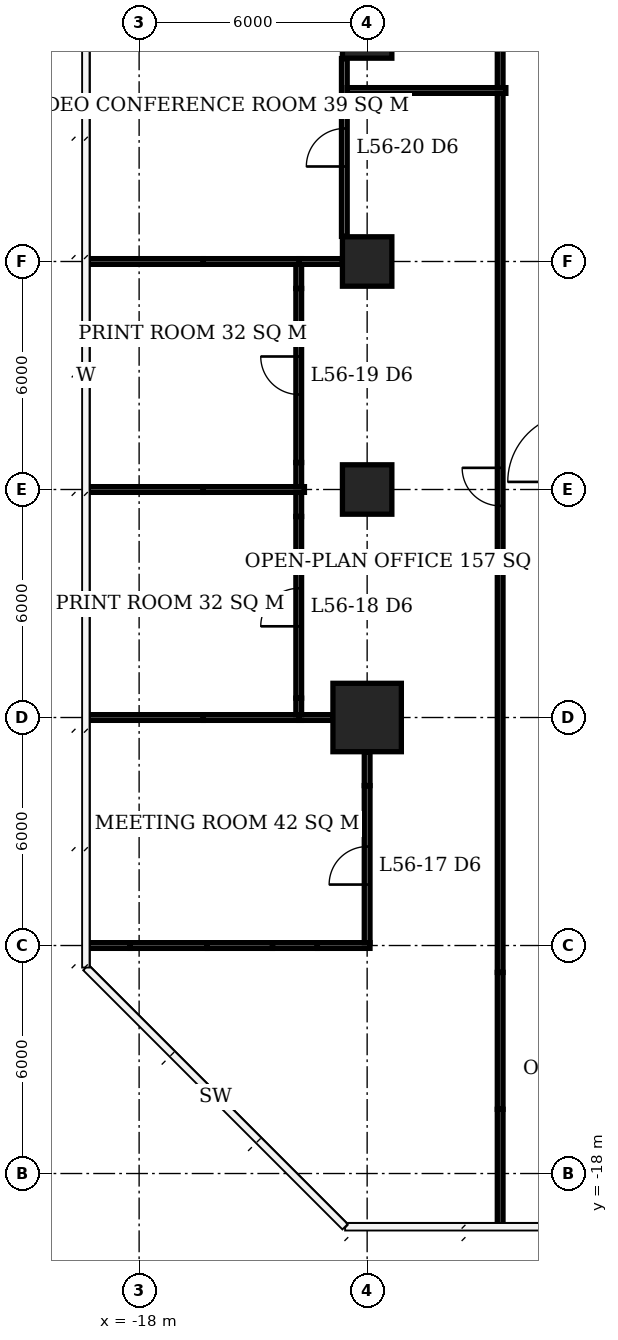
"""IFC4 building model, lengths in metres.
Left out: names, types, materials, properties, quantities, classifications, styles, units other than length and angle.
Written with IfcOpenShell. Run it as: python <this file> out.ifc"""

import sys

from ifc_helpers import new_model, si_unit, direction, frame, frame_2d, origin, origin_2d, place, context, subcontext, project, spatial, rectangle, extrude, element, fill, save


model = new_model("IFC4")
c1 = context("Model", 3, precision=1e-05, world=origin(), true_north=direction((0.0, 1.0)))
c2 = subcontext(c1, "Body", "Model", "MODEL_VIEW")
j1 = project(units=[si_unit("LENGTHUNIT", "METRE"), si_unit("PLANEANGLEUNIT", "RADIAN")], contexts=[c1])
p1 = place(None, origin())
s1 = spatial("IfcSite", under=j1, at=p1, CompositionType="ELEMENT")
p2 = place(p1, origin())
s2 = spatial("IfcBuilding", under=s1, at=p2, CompositionType="ELEMENT")
p3 = place(p2, frame((0.0, 0.0, 227.9)))
s3 = spatial("IfcBuildingStorey", under=s2, at=p3, CompositionType="ELEMENT", Elevation=227.9)
p4 = place(p3, frame((-12.0, -6.0, 0.0), z_axis=(0.0, 0.0, 1.0), x_axis=(1.0, 0.0, 0.0)))
e1 = element("IfcColumn", 1, at=p4, inside=s3, PredefinedType="COLUMN", context=c2, shape_type="SweptSolid", body=[
    extrude(rectangle(XDim=1.8, YDim=1.8, at=origin_2d()), origin(), (0.0, 0.0, 1.0), 3.9),
])
for number, where, z_axis, x_axis in (
    (2, (-12.0, 0.0, 0.0), (0.0, 0.0, 1.0), (1.0, 0.0, 0.0)),
    (3, (-12.0, 6.0, 0.0), (0.0, 0.0, 1.0), (1.0, 0.0, 0.0)),
    (4, (-12.0, 12.0, 0.0), (0.0, 0.0, 1.0), (1.0, 0.0, 0.0)),
):
    element("IfcColumn", number, at=place(p3, frame(where, z_axis=z_axis, x_axis=x_axis)), inside=s3, PredefinedType="COLUMN", context=c2, shape_type="SweptSolid", body=[
        extrude(rectangle(XDim=1.3, YDim=1.3, at=origin_2d()), origin(), (0.0, 0.0, 1.0), 3.9),
    ])
p5 = place(p3, frame((-19.4, -12.0, 0.0), z_axis=(0.0, 0.0, 1.0), x_axis=(1.0, 0.0, 0.0)))
e5 = element("IfcWall", 5, at=p5, inside=s3, PredefinedType="PARTITIONING", context=c2, shape_type="SweptSolid", body=[
    extrude(rectangle(XDim=1.163, YDim=0.15, at=frame_2d((0.582, 0.0))), origin(), (0.0, 0.0, 1.0), 3.65),
])
p6 = place(p3, frame((-18.237, -12.0, 0.0), z_axis=(0.0, 0.0, 1.0), x_axis=(1.0, 0.0, 0.0)))
e6 = element("IfcWall", 6, at=p6, inside=s3, PredefinedType="PARTITIONING", context=c2, shape_type="SweptSolid", body=[
    extrude(rectangle(XDim=2.029, YDim=0.15, at=frame_2d((1.015, 0.0))), origin(), (0.0, 0.0, 1.0), 2.65),
])
p7 = place(p3, frame((-16.208, -12.0, 0.0), z_axis=(0.0, 0.0, 1.0), x_axis=(1.0, 0.0, 0.0)))
e7 = element("IfcWall", 7, at=p7, inside=s3, PredefinedType="PARTITIONING", context=c2, shape_type="SweptSolid", body=[
    extrude(rectangle(XDim=1.718, YDim=0.15, at=frame_2d((0.859, 0.0))), origin(), (0.0, 0.0, 1.0), 3.65),
])
p8 = place(p3, frame((-14.49, -12.0, 0.0), z_axis=(0.0, 0.0, 1.0), x_axis=(1.0, 0.0, 0.0)))
e8 = element("IfcWall", 8, at=p8, inside=s3, PredefinedType="PARTITIONING", context=c2, shape_type="SweptSolid", body=[
    extrude(rectangle(XDim=1.18, YDim=0.15, at=frame_2d((0.59, 0.0))), origin(), (0.0, 0.0, 1.0), 2.65),
])
p9 = place(p3, frame((-13.31, -12.0, 0.0), z_axis=(0.0, 0.0, 1.0), x_axis=(1.0, 0.0, 0.0)))
e9 = element("IfcWall", 9, at=p9, inside=s3, PredefinedType="PARTITIONING", context=c2, shape_type="SweptSolid", body=[
    extrude(rectangle(XDim=1.385, YDim=0.15, at=frame_2d((0.692, 0.0))), origin(), (0.0, 0.0, 1.0), 3.65),
])
p10 = place(p3, frame((-19.4, -6.0, 0.0), z_axis=(0.0, 0.0, 1.0), x_axis=(1.0, 0.0, 0.0)))
e10 = element("IfcWall", 10, at=p10, inside=s3, PredefinedType="PARTITIONING", context=c2, shape_type="SweptSolid", body=[
    extrude(rectangle(XDim=3.09, YDim=0.15, at=frame_2d((1.545, 0.0))), origin(), (0.0, 0.0, 1.0), 3.65),
])
p11 = place(p3, frame((-16.31, -6.0, 0.0), z_axis=(0.0, 0.0, 1.0), x_axis=(1.0, 0.0, 0.0)))
e11 = element("IfcWall", 11, at=p11, inside=s3, PredefinedType="PARTITIONING", context=c2, shape_type="SweptSolid", body=[
    extrude(rectangle(XDim=2.585, YDim=0.15, at=frame_2d((1.292, 0.0))), origin(), (0.0, 0.0, 1.0), 2.65),
])
p12 = place(p3, frame((-13.8, -6.0, 0.0), z_axis=(0.0, 0.0, 1.0), x_axis=(1.0, 0.0, 0.0)))
e12 = element("IfcWall", 12, at=p12, inside=s3, PredefinedType="PARTITIONING", context=c2, shape_type="SweptSolid", body=[
    extrude(rectangle(XDim=0.9, YDim=0.15, at=frame_2d((0.45, 0.0))), origin(), (0.0, 0.0, 1.0), 2.65),
])
p13 = place(p3, frame((-19.35, 0.0, 0.0), z_axis=(0.0, 0.0, 1.0), x_axis=(1.0, 0.0, 0.0)))
e13 = element("IfcWall", 13, at=p13, inside=s3, PredefinedType="PARTITIONING", context=c2, shape_type="SweptSolid", body=[
    extrude(rectangle(XDim=3.04, YDim=0.15, at=frame_2d((1.52, 0.0))), origin(), (0.0, 0.0, 1.0), 3.65),
])
p14 = place(p3, frame((-16.31, 0.0, 0.0), z_axis=(0.0, 0.0, 1.0), x_axis=(1.0, 0.0, 0.0)))
e14 = element("IfcWall", 14, at=p14, inside=s3, PredefinedType="PARTITIONING", context=c2, shape_type="SweptSolid", body=[
    extrude(rectangle(XDim=2.66, YDim=0.15, at=frame_2d((1.33, 0.0))), origin(), (0.0, 0.0, 1.0), 2.65),
])
p15 = place(p3, frame((-19.35, 6.0, 0.0), z_axis=(0.0, 0.0, 1.0), x_axis=(1.0, 0.0, 0.0)))
e15 = element("IfcWall", 15, at=p15, inside=s3, PredefinedType="PARTITIONING", context=c2, shape_type="SweptSolid", body=[
    extrude(rectangle(XDim=3.04, YDim=0.15, at=frame_2d((1.52, 0.0))), origin(), (0.0, 0.0, 1.0), 3.65),
])
p16 = place(p3, frame((-16.31, 6.0, 0.0), z_axis=(0.0, 0.0, 1.0), x_axis=(1.0, 0.0, 0.0)))
e16 = element("IfcWall", 16, at=p16, inside=s3, PredefinedType="PARTITIONING", context=c2, shape_type="SweptSolid", body=[
    extrude(rectangle(XDim=2.585, YDim=0.15, at=frame_2d((1.292, 0.0))), origin(), (0.0, 0.0, 1.0), 2.65),
])
p17 = place(p3, frame((-13.8, 6.0, 0.0), z_axis=(0.0, 0.0, 1.0), x_axis=(1.0, 0.0, 0.0)))
e17 = element("IfcWall", 17, at=p17, inside=s3, PredefinedType="PARTITIONING", context=c2, shape_type="SweptSolid", body=[
    extrude(rectangle(XDim=1.15, YDim=0.15, at=frame_2d((0.575, 0.0))), origin(), (0.0, 0.0, 1.0), 2.65),
])
p18 = place(p3, frame((-13.8, -5.925, 0.0), z_axis=(0.0, 0.0, 1.0), x_axis=(0.0, 1.0, 0.0)))
e18 = element("IfcWall", 18, at=p18, inside=s3, PredefinedType="PARTITIONING", context=c2, shape_type="SweptSolid", body=[
    extrude(rectangle(XDim=0.435, YDim=0.15, at=frame_2d((0.218, 0.0))), origin(), (0.0, 0.0, 1.0), 2.65),
])
p19 = place(p3, frame((-13.8, -5.49, 0.0), z_axis=(0.0, 0.0, 1.0), x_axis=(0.0, 1.0, 0.0)))
e19 = element("IfcWall", 19, at=p19, inside=s3, PredefinedType="PARTITIONING", context=c2, shape_type="SweptSolid", body=[
    extrude(rectangle(XDim=4.78, YDim=0.15, at=frame_2d((2.39, 0.0))), origin(), (0.0, 0.0, 1.0), 3.65),
])
p20 = place(p19, frame((1.89, 0.0, 0.0)))
e20 = element("IfcOpeningElement", 20, at=p20, cuts=e19, PredefinedType="OPENING", context=c2, shape_type="SweptSolid", body=[
    extrude(rectangle(XDim=1.0, YDim=2.1, at=frame_2d((0.5, 1.05))), frame((0.0, 0.085, 0.0), z_axis=(0.0, -1.0, 0.0), x_axis=(1.0, 0.0, 0.0)), (0.0, 0.0, 1.0), 0.17),
])
for number, where, z_axis, x_axis in (
    (21, (-13.8, -0.71, 0.0), (0.0, 0.0, 1.0), (0.0, 1.0, 0.0)),
    (22, (-13.8, 0.075, 0.0), (0.0, 0.0, 1.0), (0.0, 1.0, 0.0)),
):
    element("IfcWall", number, at=place(p3, frame(where, z_axis=z_axis, x_axis=x_axis)), inside=s3, PredefinedType="PARTITIONING", context=c2, shape_type="SweptSolid", body=[
        extrude(rectangle(XDim=0.635, YDim=0.15, at=frame_2d((0.317, 0.0))), origin(), (0.0, 0.0, 1.0), 2.65),
    ])
p21 = place(p3, frame((-13.8, 0.71, 0.0), z_axis=(0.0, 0.0, 1.0), x_axis=(0.0, 1.0, 0.0)))
e23 = element("IfcWall", 23, at=p21, inside=s3, PredefinedType="PARTITIONING", context=c2, shape_type="SweptSolid", body=[
    extrude(rectangle(XDim=4.58, YDim=0.15, at=frame_2d((2.29, 0.0))), origin(), (0.0, 0.0, 1.0), 3.65),
])
p22 = place(p21, frame((1.79, 0.0, 0.0)))
e24 = element("IfcOpeningElement", 24, at=p22, cuts=e23, PredefinedType="OPENING", context=c2, shape_type="SweptSolid", body=[
    extrude(rectangle(XDim=1.0, YDim=2.1, at=frame_2d((0.5, 1.05))), frame((0.0, 0.085, 0.0), z_axis=(0.0, -1.0, 0.0), x_axis=(1.0, 0.0, 0.0)), (0.0, 0.0, 1.0), 0.17),
])
p23 = place(p3, frame((-13.8, 5.29, 0.0), z_axis=(0.0, 0.0, 1.0), x_axis=(0.0, 1.0, 0.0)))
e25 = element("IfcWall", 25, at=p23, inside=s3, PredefinedType="PARTITIONING", context=c2, shape_type="SweptSolid", body=[
    extrude(rectangle(XDim=0.635, YDim=0.15, at=frame_2d((0.317, 0.0))), origin(), (0.0, 0.0, 1.0), 2.65),
])
p24 = place(p3, frame((-12.6, 6.66, 0.0), z_axis=(0.0, 0.0, 1.0), x_axis=(0.0, 1.0, 0.0)))
e26 = element("IfcWall", 26, at=p24, inside=s3, PredefinedType="PARTITIONING", context=c2, shape_type="SweptSolid", body=[
    extrude(rectangle(XDim=4.68, YDim=0.15, at=frame_2d((2.34, 0.0))), origin(), (0.0, 0.0, 1.0), 3.65),
])
p25 = place(p24, frame((1.84, 0.0, 0.0)))
e27 = element("IfcOpeningElement", 27, at=p25, cuts=e26, PredefinedType="OPENING", context=c2, shape_type="SweptSolid", body=[
    extrude(rectangle(XDim=1.0, YDim=2.1, at=frame_2d((0.5, 1.05))), frame((0.0, 0.085, 0.0), z_axis=(0.0, -1.0, 0.0), x_axis=(1.0, 0.0, 0.0)), (0.0, 0.0, 1.0), 0.17),
])
p26 = place(p3, frame((-12.0, -11.925, 0.0), z_axis=(0.0, 0.0, 1.0), x_axis=(0.0, 1.0, 0.0)))
e28 = element("IfcWall", 28, at=p26, inside=s3, PredefinedType="PARTITIONING", context=c2, shape_type="SweptSolid", body=[
    extrude(rectangle(XDim=4.133, YDim=0.15, at=frame_2d((2.066, 0.0))), origin(), (0.0, 0.0, 1.0), 3.65),
])
p27 = place(p26, frame((1.529, 0.0, 0.0)))
e29 = element("IfcOpeningElement", 29, at=p27, cuts=e28, PredefinedType="OPENING", context=c2, shape_type="SweptSolid", body=[
    extrude(rectangle(XDim=1.0, YDim=2.1, at=frame_2d((0.5, 1.05))), frame((0.0, 0.085, 0.0), z_axis=(0.0, -1.0, 0.0), x_axis=(1.0, 0.0, 0.0)), (0.0, 0.0, 1.0), 0.17),
])
p28 = place(p3, frame((-12.0, -7.792, 0.0), z_axis=(0.0, 0.0, 1.0), x_axis=(0.0, 1.0, 0.0)))
e30 = element("IfcWall", 30, at=p28, inside=s3, PredefinedType="PARTITIONING", context=c2, shape_type="SweptSolid", body=[
    extrude(rectangle(XDim=0.892, YDim=0.15, at=frame_2d((0.446, 0.0))), origin(), (0.0, 0.0, 1.0), 2.65),
])
p29 = place(p3, frame((-12.525, 10.5, 0.0), z_axis=(0.0, 0.0, 1.0), x_axis=(1.0, 0.0, 0.0)))
e31 = element("IfcWall", 31, at=p29, inside=s3, PredefinedType="PARTITIONING", context=c2, shape_type="SweptSolid", body=[
    extrude(rectangle(XDim=4.175, YDim=0.15, at=frame_2d((2.087, 0.0))), origin(), (0.0, 0.0, 1.0), 3.65),
])
p30 = place(p3, frame((-8.5, -19.4, 0.0), z_axis=(0.0, 0.0, 1.0), x_axis=(0.0, 1.0, 0.0)))
e32 = element("IfcWall", 32, at=p30, inside=s3, PredefinedType="PARTITIONING", context=c2, shape_type="SweptSolid", body=[
    extrude(rectangle(XDim=3.09, YDim=0.15, at=frame_2d((1.545, 0.0))), origin(), (0.0, 0.0, 1.0), 3.65),
])
p31 = place(p3, frame((-8.5, -16.31, 0.0), z_axis=(0.0, 0.0, 1.0), x_axis=(0.0, 1.0, 0.0)))
e33 = element("IfcWall", 33, at=p31, inside=s3, PredefinedType="PARTITIONING", context=c2, shape_type="SweptSolid", body=[
    extrude(rectangle(XDim=3.602, YDim=0.15, at=frame_2d((1.801, 0.0))), origin(), (0.0, 0.0, 1.0), 2.65),
])
p32 = place(p3, frame((-8.5, -12.708, 0.0), z_axis=(0.0, 0.0, 1.0), x_axis=(0.0, 1.0, 0.0)))
e34 = element("IfcWall", 34, at=p32, inside=s3, PredefinedType="PARTITIONING", context=c2, shape_type="SweptSolid", body=[
    extrude(rectangle(XDim=23.133, YDim=0.15, at=frame_2d((11.566, 0.0))), origin(), (0.0, 0.0, 1.0), 3.65),
])
p33 = place(p32, frame((12.278, 0.0, 0.0)))
e35 = element("IfcOpeningElement", 35, at=p33, cuts=e34, PredefinedType="OPENING", context=c2, shape_type="SweptSolid", body=[
    extrude(rectangle(XDim=1.0, YDim=2.1, at=frame_2d((0.5, 1.05))), frame((0.0, 0.085, 0.0), z_axis=(0.0, -1.0, 0.0), x_axis=(1.0, 0.0, 0.0)), (0.0, 0.0, 1.0), 0.17),
])
p34 = place(p3, frame((-8.5, 10.575, 0.0), z_axis=(0.0, 0.0, 1.0), x_axis=(0.0, 1.0, 0.0)))
e36 = element("IfcWall", 36, at=p34, inside=s3, PredefinedType="PARTITIONING", context=c2, shape_type="SweptSolid", body=[
    extrude(rectangle(XDim=14.825, YDim=0.15, at=frame_2d((7.413, 0.0))), origin(), (0.0, 0.0, 1.0), 3.65),
])
p35 = place(p34, frame((9.045, 0.0, 0.0)))
e37 = element("IfcOpeningElement", 37, at=p35, cuts=e36, PredefinedType="OPENING", context=c2, shape_type="SweptSolid", body=[
    extrude(rectangle(XDim=1.0, YDim=2.1, at=frame_2d((0.5, 1.05))), frame((0.0, 0.085, 0.0), z_axis=(0.0, -1.0, 0.0), x_axis=(1.0, 0.0, 0.0)), (0.0, 0.0, 1.0), 0.17),
])
p36 = place(p27, origin())
e38 = element("IfcDoor", 38, at=p36, inside=s3, OperationType="SINGLE_SWING_LEFT", PredefinedType="DOOR", context=c2, shape_type="SweptSolid", body=[
    extrude(rectangle(XDim=1.0, YDim=2.1, at=frame_2d((0.5, 1.05))), frame((0.0, 0.025, 0.0), z_axis=(0.0, -1.0, 0.0), x_axis=(1.0, 0.0, 0.0)), (0.0, 0.0, 1.0), 0.05),
])
fill(e29, e38)
p37 = place(p20, origin())
e39 = element("IfcDoor", 39, at=p37, inside=s3, OperationType="SINGLE_SWING_LEFT", PredefinedType="DOOR", context=c2, shape_type="SweptSolid", body=[
    extrude(rectangle(XDim=1.0, YDim=2.1, at=frame_2d((0.5, 1.05))), frame((0.0, 0.025, 0.0), z_axis=(0.0, -1.0, 0.0), x_axis=(1.0, 0.0, 0.0)), (0.0, 0.0, 1.0), 0.05),
])
fill(e20, e39)
p38 = place(p22, origin())
e40 = element("IfcDoor", 40, at=p38, inside=s3, OperationType="SINGLE_SWING_RIGHT", PredefinedType="DOOR", context=c2, shape_type="SweptSolid", body=[
    extrude(rectangle(XDim=1.0, YDim=2.1, at=frame_2d((0.5, 1.05))), frame((0.0, 0.025, 0.0), z_axis=(0.0, -1.0, 0.0), x_axis=(1.0, 0.0, 0.0)), (0.0, 0.0, 1.0), 0.05),
])
fill(e24, e40)
p39 = place(p25, origin())
e41 = element("IfcDoor", 41, at=p39, inside=s3, OperationType="SINGLE_SWING_LEFT", PredefinedType="DOOR", context=c2, shape_type="SweptSolid", body=[
    extrude(rectangle(XDim=1.0, YDim=2.1, at=frame_2d((0.5, 1.05))), frame((0.0, 0.025, 0.0), z_axis=(0.0, -1.0, 0.0), x_axis=(1.0, 0.0, 0.0)), (0.0, 0.0, 1.0), 0.05),
])
fill(e27, e41)
p40 = place(p33, origin())
e42 = element("IfcDoor", 42, at=p40, inside=s3, OperationType="SINGLE_SWING_RIGHT", PredefinedType="DOOR", context=c2, shape_type="SweptSolid", body=[
    extrude(rectangle(XDim=1.0, YDim=2.1, at=frame_2d((0.5, 1.05))), frame((0.0, 0.025, 0.0), z_axis=(0.0, -1.0, 0.0), x_axis=(1.0, 0.0, 0.0)), (0.0, 0.0, 1.0), 0.05),
])
fill(e35, e42)
save(model, sys.argv[1])
